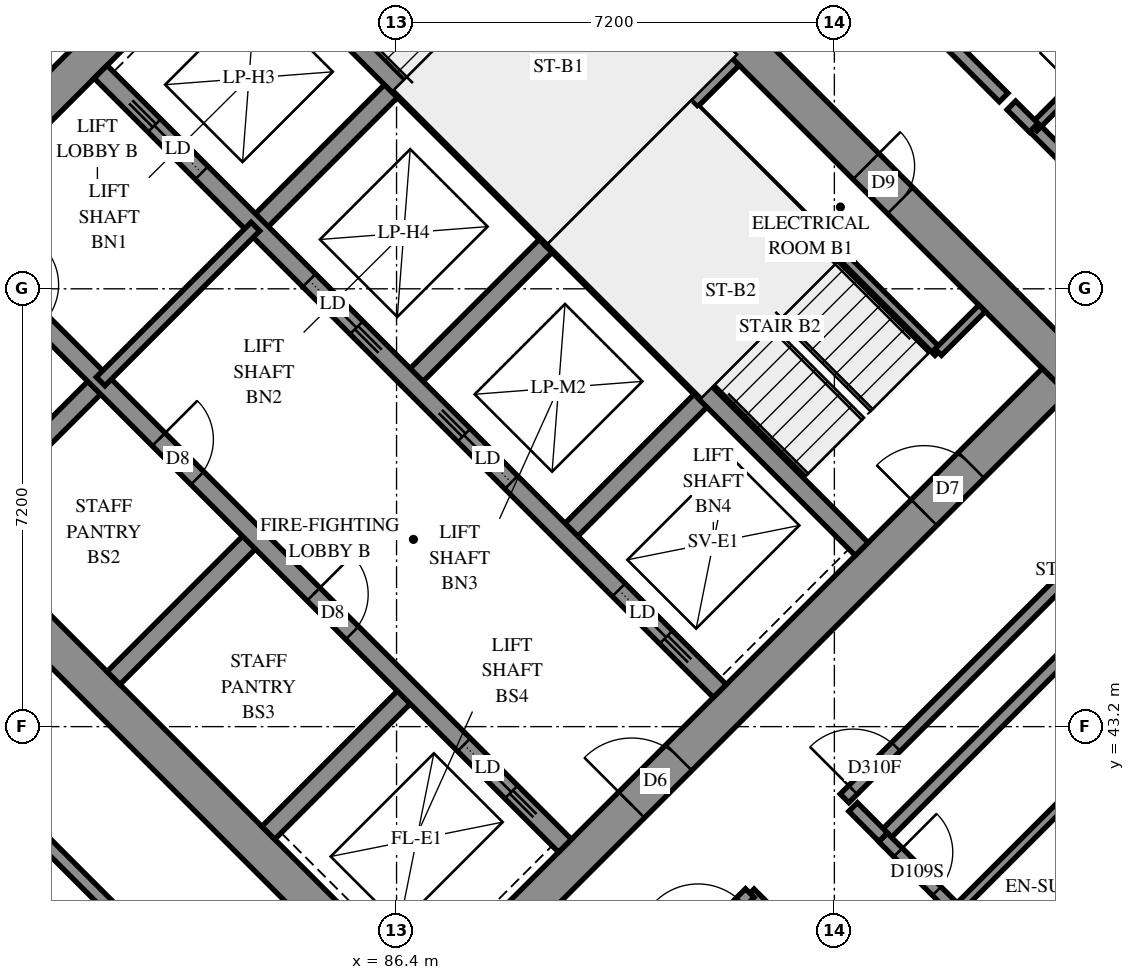
"""IFC4 building model, lengths in metres.
Left out: names, types, materials, properties, quantities, classifications, styles, units other than length and angle.
Written with IfcOpenShell. Run it as: python <this file> out.ifc"""

import sys

from ifc_helpers import new_model, si_unit, direction, frame, frame_2d, origin, place, context, subcontext, project, spatial, rectangle, extrude, element, fill, save


model = new_model("IFC4")
c1 = context("Model", 3, precision=1e-05, world=origin(), true_north=direction((0.0, 1.0)))
c2 = subcontext(c1, "Body", "Model", "MODEL_VIEW")
j1 = project(units=[si_unit("LENGTHUNIT", "METRE"), si_unit("PLANEANGLEUNIT", "RADIAN")], contexts=[c1])
p1 = place(None, origin())
s1 = spatial("IfcSite", under=j1, at=p1, CompositionType="ELEMENT")
p2 = place(p1, origin())
s2 = spatial("IfcBuilding", under=s1, at=p2, CompositionType="ELEMENT")
p3 = place(p2, frame((0.0, 0.0, 155.8)))
s3 = spatial("IfcBuildingStorey", under=s2, at=p3, CompositionType="ELEMENT", Elevation=155.8)
p4 = place(p3, frame((76.018, 49.302, -0.3), z_axis=(0.0, 0.0, 1.0), x_axis=(0.7071067812, -0.7071067812, 0.0)))
e1 = element("IfcWall", 1, at=p4, inside=s3, PredefinedType="SHEAR", context=c2, shape_type="SweptSolid", body=[
    extrude(rectangle(XDim=15.6, YDim=0.6, at=frame_2d((7.8, 0.0))), origin(), (0.0, 0.0, 1.0), 2.7),
])
p5 = place(p3, frame((86.625, 59.908, -0.3), z_axis=(0.0, 0.0, 1.0), x_axis=(0.7071067812, -0.7071067812, 0.0)))
e2 = element("IfcWall", 2, at=p5, inside=s3, PredefinedType="SHEAR", context=c2, shape_type="SweptSolid", body=[
    extrude(rectangle(XDim=15.6, YDim=0.6, at=frame_2d((7.8, 0.0))), origin(), (0.0, 0.0, 1.0), 2.7),
])
p6 = place(p5, frame((10.6, 0.0, 0.3)))
e3 = element("IfcOpeningElement", 3, at=p6, cuts=e2, PredefinedType="OPENING", context=c2, shape_type="SweptSolid", body=[
    extrude(rectangle(XDim=0.8, YDim=2.1, at=frame_2d((0.4, 1.05))), frame((0.0, 0.31, 0.0), z_axis=(0.0, -1.0, 0.0), x_axis=(1.0, 0.0, 0.0)), (0.0, 0.0, 1.0), 0.62),
])
p7 = place(p3, frame((76.442, 49.302, -0.3), z_axis=(0.0, 0.0, 1.0), x_axis=(0.7071067812, 0.7071067812, 0.0)))
e4 = element("IfcWall", 4, at=p7, inside=s3, PredefinedType="SHEAR", context=c2, shape_type="SweptSolid", body=[
    extrude(rectangle(XDim=14.4, YDim=0.6, at=frame_2d((7.2, 0.0))), origin(), (0.0, 0.0, 1.0), 2.7),
])
p8 = place(p7, frame((4.55, 0.0, 0.3)))
e5 = element("IfcOpeningElement", 5, at=p8, cuts=e4, PredefinedType="OPENING", context=c2, shape_type="SweptSolid", body=[
    extrude(rectangle(XDim=1.1, YDim=2.1, at=frame_2d((0.55, 1.05))), frame((0.0, 0.31, 0.0), z_axis=(0.0, -1.0, 0.0), x_axis=(1.0, 0.0, 0.0)), (0.0, 0.0, 1.0), 0.62),
])
p9 = place(p7, frame((11.35, 0.0, 0.3)))
e6 = element("IfcOpeningElement", 6, at=p9, cuts=e4, PredefinedType="OPENING", context=c2, shape_type="SweptSolid", body=[
    extrude(rectangle(XDim=1.1, YDim=2.1, at=frame_2d((0.55, 1.05))), frame((0.0, 0.31, 0.0), z_axis=(0.0, -1.0, 0.0), x_axis=(1.0, 0.0, 0.0)), (0.0, 0.0, 1.0), 0.62),
])
p10 = place(p3, frame((87.049, 38.695, -0.3), z_axis=(0.0, 0.0, 1.0), x_axis=(0.7071067812, 0.7071067812, 0.0)))
e7 = element("IfcWall", 7, at=p10, inside=s3, PredefinedType="SHEAR", context=c2, shape_type="SweptSolid", body=[
    extrude(rectangle(XDim=14.4, YDim=0.6, at=frame_2d((7.2, 0.0))), origin(), (0.0, 0.0, 1.0), 2.7),
])
p11 = place(p10, frame((4.55, 0.0, 0.3)))
e8 = element("IfcOpeningElement", 8, at=p11, cuts=e7, PredefinedType="OPENING", context=c2, shape_type="SweptSolid", body=[
    extrude(rectangle(XDim=1.1, YDim=2.1, at=frame_2d((0.55, 1.05))), frame((0.0, 0.31, 0.0), z_axis=(0.0, -1.0, 0.0), x_axis=(1.0, 0.0, 0.0)), (0.0, 0.0, 1.0), 0.62),
])
p12 = place(p10, frame((11.35, 0.0, 0.3)))
e9 = element("IfcOpeningElement", 9, at=p12, cuts=e7, PredefinedType="OPENING", context=c2, shape_type="SweptSolid", body=[
    extrude(rectangle(XDim=1.1, YDim=2.1, at=frame_2d((0.55, 1.05))), frame((0.0, 0.31, 0.0), z_axis=(0.0, -1.0, 0.0), x_axis=(1.0, 0.0, 0.0)), (0.0, 0.0, 1.0), 0.62),
])
for number, where, z_axis, x_axis in (
    (10, (79.2, 46.544, 0.0), (0.0, 0.0, 1.0), (0.707, 0.707, 0.0)),
    (11, (84.079, 51.423, 0.0), (0.0, 0.0, 1.0), (0.707, 0.707, 0.0)),
):
    element("IfcWall", number, at=place(p3, frame(where, z_axis=z_axis, x_axis=x_axis)), inside=s3, PredefinedType="SOLIDWALL", context=c2, shape_type="SweptSolid", body=[
        extrude(rectangle(XDim=3.3, YDim=0.3, at=frame_2d((1.65, 0.0))), origin(), (0.0, 0.0, 1.0), 3.1),
    ])
p13 = place(p3, frame((81.746, 43.999, 0.0), z_axis=(0.0, 0.0, 1.0), x_axis=(0.7071067812, 0.7071067812, 0.0)))
e12 = element("IfcWall", 12, at=p13, inside=s3, PredefinedType="SOLIDWALL", context=c2, shape_type="SweptSolid", body=[
    extrude(rectangle(XDim=3.3, YDim=0.3, at=frame_2d((1.65, 0.0))), origin(), (0.0, 0.0, 1.0), 3.1),
])
p14 = place(p3, frame((86.625, 48.878, 0.0), z_axis=(0.0, 0.0, 1.0), x_axis=(0.7071067812, 0.7071067812, 0.0)))
e13 = element("IfcWall", 13, at=p14, inside=s3, PredefinedType="SOLIDWALL", context=c2, shape_type="SweptSolid", body=[
    extrude(rectangle(XDim=3.3, YDim=0.3, at=frame_2d((1.65, 0.0))), origin(), (0.0, 0.0, 1.0), 3.1),
])
p15 = place(p3, frame((84.291, 41.453, 0.0), z_axis=(0.0, 0.0, 1.0), x_axis=(0.7071067812, 0.7071067812, 0.0)))
e14 = element("IfcWall", 14, at=p15, inside=s3, PredefinedType="SOLIDWALL", context=c2, shape_type="SweptSolid", body=[
    extrude(rectangle(XDim=3.3, YDim=0.3, at=frame_2d((1.65, 0.0))), origin(), (0.0, 0.0, 1.0), 3.1),
])
p16 = place(p3, frame((89.17, 46.332, 0.0), z_axis=(0.0, 0.0, 1.0), x_axis=(0.7071067812, 0.7071067812, 0.0)))
e15 = element("IfcWall", 15, at=p16, inside=s3, PredefinedType="SOLIDWALL", context=c2, shape_type="SweptSolid", body=[
    extrude(rectangle(XDim=3.3, YDim=0.3, at=frame_2d((1.65, 0.0))), origin(), (0.0, 0.0, 1.0), 3.1),
])
p17 = place(p3, frame((78.988, 51.423, 0.0), z_axis=(0.0, 0.0, 1.0), x_axis=(0.7071067812, -0.7071067812, 0.0)))
e16 = element("IfcWall", 16, at=p17, inside=s3, PredefinedType="SOLIDWALL", context=c2, shape_type="SweptSolid", body=[
    extrude(rectangle(XDim=14.4, YDim=0.3, at=frame_2d((7.2, 0.0))), origin(), (0.0, 0.0, 1.0), 3.1),
])
p18 = place(p17, frame((1.35, 0.0, 0.0)))
e17 = element("IfcOpeningElement", 17, at=p18, cuts=e16, PredefinedType="OPENING", context=c2, shape_type="SweptSolid", body=[
    extrude(rectangle(XDim=0.9, YDim=2.1, at=frame_2d((0.45, 1.05))), frame((0.0, 0.16, 0.0), z_axis=(0.0, -1.0, 0.0), x_axis=(1.0, 0.0, 0.0)), (0.0, 0.0, 1.0), 0.32),
])
p19 = place(p17, frame((4.95, 0.0, 0.0)))
e18 = element("IfcOpeningElement", 18, at=p19, cuts=e16, PredefinedType="OPENING", context=c2, shape_type="SweptSolid", body=[
    extrude(rectangle(XDim=0.9, YDim=2.1, at=frame_2d((0.45, 1.05))), frame((0.0, 0.16, 0.0), z_axis=(0.0, -1.0, 0.0), x_axis=(1.0, 0.0, 0.0)), (0.0, 0.0, 1.0), 0.32),
])
p20 = place(p17, frame((8.55, 0.0, 0.0)))
e19 = element("IfcOpeningElement", 19, at=p20, cuts=e16, PredefinedType="OPENING", context=c2, shape_type="SweptSolid", body=[
    extrude(rectangle(XDim=0.9, YDim=2.1, at=frame_2d((0.45, 1.05))), frame((0.0, 0.16, 0.0), z_axis=(0.0, -1.0, 0.0), x_axis=(1.0, 0.0, 0.0)), (0.0, 0.0, 1.0), 0.32),
])
p21 = place(p17, frame((12.05, 0.0, 0.0)))
e20 = element("IfcOpeningElement", 20, at=p21, cuts=e16, PredefinedType="OPENING", context=c2, shape_type="SweptSolid", body=[
    extrude(rectangle(XDim=1.1, YDim=2.1, at=frame_2d((0.55, 1.05))), frame((0.0, 0.16, 0.0), z_axis=(0.0, -1.0, 0.0), x_axis=(1.0, 0.0, 0.0)), (0.0, 0.0, 1.0), 0.32),
])
p22 = place(p3, frame((81.534, 53.969, 0.0), z_axis=(0.0, 0.0, 1.0), x_axis=(0.707103309, -0.7071102534, 0.0)))
e21 = element("IfcWall", 21, at=p22, inside=s3, PredefinedType="SOLIDWALL", context=c2, shape_type="SweptSolid", body=[
    extrude(rectangle(XDim=14.4, YDim=0.3, at=frame_2d((7.2, 0.0))), origin(), (0.0, 0.0, 1.0), 3.1),
])
p23 = place(p22, frame((1.25, 0.0, 0.0)))
e22 = element("IfcOpeningElement", 22, at=p23, cuts=e21, PredefinedType="OPENING", context=c2, shape_type="SweptSolid", body=[
    extrude(rectangle(XDim=1.1, YDim=2.1, at=frame_2d((0.55, 1.05))), frame((0.0, 0.16, 0.0), z_axis=(0.0, -1.0, 0.0), x_axis=(1.0, 0.0, 0.0)), (0.0, 0.0, 1.0), 0.32),
])
p24 = place(p22, frame((4.85, 0.0, 0.0)))
e23 = element("IfcOpeningElement", 23, at=p24, cuts=e21, PredefinedType="OPENING", context=c2, shape_type="SweptSolid", body=[
    extrude(rectangle(XDim=1.1, YDim=2.1, at=frame_2d((0.55, 1.05))), frame((0.0, 0.16, 0.0), z_axis=(0.0, -1.0, 0.0), x_axis=(1.0, 0.0, 0.0)), (0.0, 0.0, 1.0), 0.32),
])
p25 = place(p22, frame((8.45, 0.0, 0.0)))
e24 = element("IfcOpeningElement", 24, at=p25, cuts=e21, PredefinedType="OPENING", context=c2, shape_type="SweptSolid", body=[
    extrude(rectangle(XDim=1.1, YDim=2.1, at=frame_2d((0.55, 1.05))), frame((0.0, 0.16, 0.0), z_axis=(0.0, -1.0, 0.0), x_axis=(1.0, 0.0, 0.0)), (0.0, 0.0, 1.0), 0.32),
])
p26 = place(p22, frame((12.05, 0.0, 0.0)))
e25 = element("IfcOpeningElement", 25, at=p26, cuts=e21, PredefinedType="OPENING", context=c2, shape_type="SweptSolid", body=[
    extrude(rectangle(XDim=1.1, YDim=2.1, at=frame_2d((0.55, 1.05))), frame((0.0, 0.16, 0.0), z_axis=(0.0, -1.0, 0.0), x_axis=(1.0, 0.0, 0.0)), (0.0, 0.0, 1.0), 0.32),
])
for number, where, z_axis, x_axis in (
    (26, (83.867, 56.302, 0.0), (0.0, 0.0, 1.0), (0.707, -0.707, 0.0)),
    (27, (88.958, 51.211, 0.0), (0.0, 0.0, 1.0), (0.707, -0.707, 0.0)),
):
    element("IfcWall", number, at=place(p3, frame(where, z_axis=z_axis, x_axis=x_axis)), inside=s3, PredefinedType="SOLIDWALL", context=c2, shape_type="SweptSolid", body=[
        extrude(rectangle(XDim=7.2, YDim=0.3, at=frame_2d((3.6, 0.0))), origin(), (0.0, 0.0, 1.0), 3.1),
    ])
p27 = place(p3, frame((88.958, 51.211, 0.0), z_axis=(0.0, 0.0, 1.0), x_axis=(0.7071067812, 0.7071067812, 0.0)))
e28 = element("IfcWall", 28, at=p27, inside=s3, PredefinedType="SOLIDWALL", context=c2, shape_type="SweptSolid", body=[
    extrude(rectangle(XDim=4.2, YDim=0.3, at=frame_2d((2.1, 0.0))), origin(), (0.0, 0.0, 1.0), 3.1),
])
p28 = place(p3, frame((91.313, 53.354, 0.0), z_axis=(0.0, 0.0, 1.0), x_axis=(0.7071067812, -0.7071067812, 0.0)))
e29 = element("IfcWall", 29, at=p28, inside=s3, PredefinedType="PARTITIONING", context=c2, shape_type="SweptSolid", body=[
    extrude(rectangle(XDim=5.65, YDim=0.15, at=frame_2d((2.825, 0.0))), origin(), (0.0, 0.0, 1.0), 3.1),
])
p29 = place(p3, frame((95.308, 49.358, 0.0), z_axis=(0.0, 0.0, 1.0), x_axis=(0.70705776, 0.707155799, 0.0)))
e30 = element("IfcWall", 30, at=p29, inside=s3, PredefinedType="PARTITIONING", context=c2, shape_type="SweptSolid", body=[
    extrude(rectangle(XDim=1.02, YDim=0.15, at=frame_2d((0.51, 0.0))), origin(), (0.0, 0.0, 1.0), 3.1),
])
p30 = place(p3, frame((81.534, 48.878, 0.0), z_axis=(0.0, 0.0, 1.0), x_axis=(0.707092892, 0.7071206701, 0.0)))
e31 = element("IfcWall", 31, at=p30, inside=s3, PredefinedType="PARTITIONING", context=c2, shape_type="SweptSolid", body=[
    extrude(rectangle(XDim=3.6, YDim=0.2, at=frame_2d((1.8, 0.0))), origin(), (0.0, 0.0, 1.0), 3.1),
])
p31 = place(p3, frame((94.401, 41.383, 0.0), z_axis=(0.0, 0.0, 1.0), x_axis=(0.7071067812, 0.7071067812, 0.0)))
e32 = element("IfcWall", 32, at=p31, inside=s3, PredefinedType="PARTITIONING", context=c2, shape_type="SweptSolid", body=[
    extrude(rectangle(XDim=12.014, YDim=0.2, at=frame_2d((6.007, 0.0))), origin(), (0.0, 0.0, 1.0), 3.1),
])
p32 = place(p3, frame((92.209, 40.459, 0.0), z_axis=(0.0, 0.0, 1.0), x_axis=(0.7071067812, -0.7071067812, 0.0)))
e33 = element("IfcWall", 33, at=p32, inside=s3, PredefinedType="PARTITIONING", context=c2, shape_type="SweptSolid", body=[
    extrude(rectangle(XDim=11.698, YDim=0.2, at=frame_2d((5.849, 0.0))), origin(), (0.0, 0.0, 1.0), 3.1),
])
p33 = place(p32, frame((3.047, 0.0, 0.0)))
e34 = element("IfcOpeningElement", 34, at=p33, cuts=e33, PredefinedType="OPENING", context=c2, shape_type="SweptSolid", body=[
    extrude(rectangle(XDim=0.9, YDim=2.1, at=frame_2d((0.45, 1.05))), frame((0.0, 0.11, 0.0), z_axis=(0.0, -1.0, 0.0), x_axis=(1.0, 0.0, 0.0)), (0.0, 0.0, 1.0), 0.22),
])
p34 = place(p32, frame((8.056, 0.0, 0.0)))
e35 = element("IfcOpeningElement", 35, at=p34, cuts=e33, PredefinedType="OPENING", context=c2, shape_type="SweptSolid", body=[
    extrude(rectangle(XDim=1.0, YDim=2.1, at=frame_2d((0.5, 1.05))), frame((0.0, 0.11, 0.0), z_axis=(0.0, -1.0, 0.0), x_axis=(1.0, 0.0, 0.0)), (0.0, 0.0, 1.0), 0.22),
])
p35 = place(p3, frame((93.767, 42.021, 0.0), z_axis=(0.0, 0.0, 1.0), x_axis=(0.7071067812, 0.7071067812, 0.0)))
e36 = element("IfcWall", 36, at=p35, inside=s3, PredefinedType="PARTITIONING", context=c2, shape_type="SweptSolid", body=[
    extrude(rectangle(XDim=9.998, YDim=0.2, at=frame_2d((4.999, 0.0))), origin(), (0.0, 0.0, 1.0), 3.1),
])
p36 = place(p35, frame((0.196, 0.0, 0.0)))
e37 = element("IfcOpeningElement", 37, at=p36, cuts=e36, PredefinedType="OPENING", context=c2, shape_type="SweptSolid", body=[
    extrude(rectangle(XDim=1.0, YDim=2.1, at=frame_2d((0.5, 1.05))), frame((0.0, 0.11, 0.0), z_axis=(0.0, -1.0, 0.0), x_axis=(1.0, 0.0, 0.0)), (0.0, 0.0, 1.0), 0.22),
])
p37 = place(p3, frame((80.423, 41.497, 0.0), z_axis=(0.0, 0.0, 1.0), x_axis=(0.7071067812, -0.7071067812, 0.0)))
e38 = element("IfcWall", 38, at=p37, inside=s3, PredefinedType="PARTITIONING", context=c2, shape_type="SweptSolid", body=[
    extrude(rectangle(XDim=9.065, YDim=0.2, at=frame_2d((4.532, 0.0))), origin(), (0.0, 0.0, 1.0), 3.1),
])
p38 = place(p3, frame((86.837, 35.091, 0.0), z_axis=(0.0, 0.0, 1.0), x_axis=(0.7071067812, 0.7071067812, 0.0)))
e39 = element("IfcWall", 39, at=p38, inside=s3, PredefinedType="PARTITIONING", context=c2, shape_type="SweptSolid", body=[
    extrude(rectangle(XDim=7.597, YDim=0.2, at=frame_2d((3.799, 0.0))), origin(), (0.0, 0.0, 1.0), 3.1),
])
p39 = place(p38, frame((6.395, 0.0, 0.0)))
e40 = element("IfcOpeningElement", 40, at=p39, cuts=e39, PredefinedType="OPENING", context=c2, shape_type="SweptSolid", body=[
    extrude(rectangle(XDim=1.0, YDim=2.1, at=frame_2d((0.5, 1.05))), frame((0.0, 0.11, 0.0), z_axis=(0.0, -1.0, 0.0), x_axis=(1.0, 0.0, 0.0)), (0.0, 0.0, 1.0), 0.22),
])
p40 = place(p3, frame((94.399, 41.379, 0.0), z_axis=(0.0, 0.0, 1.0), x_axis=(0.7071067812, -0.7071067812, 0.0)))
e41 = element("IfcWall", 41, at=p40, inside=s3, PredefinedType="PARTITIONING", context=c2, shape_type="SweptSolid", body=[
    extrude(rectangle(XDim=3.601, YDim=0.2, at=frame_2d((1.8, 0.0))), origin(), (0.0, 0.0, 1.0), 3.1),
])
p41 = place(p40, frame((0.35, 0.0, 0.0)))
e42 = element("IfcOpeningElement", 42, at=p41, cuts=e41, PredefinedType="OPENING", context=c2, shape_type="SweptSolid", body=[
    extrude(rectangle(XDim=0.9, YDim=2.1, at=frame_2d((0.45, 1.05))), frame((0.0, 0.11, 0.0), z_axis=(0.0, -1.0, 0.0), x_axis=(1.0, 0.0, 0.0)), (0.0, 0.0, 1.0), 0.22),
])
p42 = place(p3, frame((96.882, 53.053, 0.0), z_axis=(0.0, 0.0, 1.0), x_axis=(0.7071067812, -0.7071067812, 0.0)))
e43 = element("IfcWall", 43, at=p42, inside=s3, PredefinedType="PARTITIONING", context=c2, shape_type="SweptSolid", body=[
    extrude(rectangle(XDim=2.86, YDim=0.2, at=frame_2d((1.43, 0.0))), origin(), (0.0, 0.0, 1.0), 3.1),
])
for number, where, z_axis, x_axis in (
    (44, (95.603, 40.181, 0.0), (0.0, 0.0, 1.0), (0.707, 0.707, 0.0)),
    (45, (96.947, 38.837, 0.0), (0.0, 0.0, 1.0), (0.707, 0.707, 0.0)),
):
    element("IfcWall", number, at=place(p3, frame(where, z_axis=z_axis, x_axis=x_axis)), inside=s3, PredefinedType="PARTITIONING", context=c2, shape_type="SweptSolid", body=[
        extrude(rectangle(XDim=2.401, YDim=0.15, at=frame_2d((1.201, 0.0))), origin(), (0.0, 0.0, 1.0), 3.1),
    ])
p43 = place(p3, frame((96.877, 53.051, 0.0), z_axis=(0.0, 0.0, 1.0), x_axis=(0.707131173, 0.7070823885, 0.0)))
e46 = element("IfcWall", 46, at=p43, inside=s3, PredefinedType="PARTITIONING", context=c2, shape_type="SweptSolid", body=[
    extrude(rectangle(XDim=2.05, YDim=0.15, at=frame_2d((1.025, 0.0))), origin(), (0.0, 0.0, 1.0), 3.1),
])
p44 = place(p43, frame((0.946, 0.0, 0.0)))
e47 = element("IfcOpeningElement", 47, at=p44, cuts=e46, PredefinedType="OPENING", context=c2, shape_type="SweptSolid", body=[
    extrude(rectangle(XDim=0.8, YDim=2.1, at=frame_2d((0.4, 1.05))), frame((0.0, 0.085, 0.0), z_axis=(0.0, -1.0, 0.0), x_axis=(1.0, 0.0, 0.0)), (0.0, 0.0, 1.0), 0.17),
])
p45 = place(p3, frame((95.494, 54.438, 0.0), z_axis=(0.0, 0.0, 1.0), x_axis=(0.706312726, -0.7078999456, 0.0)))
e48 = element("IfcWall", 48, at=p45, inside=s3, PredefinedType="PARTITIONING", context=c2, shape_type="SweptSolid", body=[
    extrude(rectangle(XDim=1.26, YDim=0.2, at=frame_2d((0.63, 0.0))), origin(), (0.0, 0.0, 1.0), 3.1),
])
p46 = place(p3, frame((93.909, 41.879, 0.0), z_axis=(0.0, 0.0, 1.0), x_axis=(0.7056768426, -0.7085338339, 0.0)))
e49 = element("IfcWall", 49, at=p46, inside=s3, PredefinedType="PARTITIONING", context=c2, shape_type="SweptSolid", body=[
    extrude(rectangle(XDim=0.7, YDim=0.2, at=frame_2d((0.35, 0.0))), origin(), (0.0, 0.0, 1.0), 3.1),
])
p47 = place(p3, frame((96.51, 53.416, 0.0), z_axis=(0.0, 0.0, 1.0), x_axis=(0.7090308706, -0.7051774419, 0.0)))
e50 = element("IfcWall", 50, at=p47, inside=s3, PredefinedType="PARTITIONING", context=c2, shape_type="SweptSolid", body=[
    extrude(rectangle(XDim=0.519, YDim=0.2, at=frame_2d((0.26, 0.0))), origin(), (0.0, 0.0, 1.0), 3.1),
])
p48 = place(p6, origin())
e51 = element("IfcDoor", 51, at=p48, inside=s3, OperationType="SINGLE_SWING_RIGHT", PredefinedType="DOOR", context=c2, shape_type="SweptSolid", body=[
    extrude(rectangle(XDim=0.8, YDim=2.1, at=frame_2d((0.4, 1.05))), frame((0.0, 0.025, 0.0), z_axis=(0.0, -1.0, 0.0), x_axis=(1.0, 0.0, 0.0)), (0.0, 0.0, 1.0), 0.05),
])
fill(e3, e51)
p49 = place(p11, origin())
e52 = element("IfcDoor", 52, at=p49, inside=s3, OperationType="DOUBLE_DOOR_SINGLE_SWING", PredefinedType="DOOR", context=c2, shape_type="SweptSolid", body=[
    extrude(rectangle(XDim=1.1, YDim=2.1, at=frame_2d((0.55, 1.05))), frame((0.0, 0.025, 0.0), z_axis=(0.0, -1.0, 0.0), x_axis=(1.0, 0.0, 0.0)), (0.0, 0.0, 1.0), 0.05),
])
fill(e8, e52)
p50 = place(p12, origin())
e53 = element("IfcDoor", 53, at=p50, inside=s3, OperationType="SINGLE_SWING_RIGHT", PredefinedType="DOOR", context=c2, shape_type="SweptSolid", body=[
    extrude(rectangle(XDim=1.1, YDim=2.1, at=frame_2d((0.55, 1.05))), frame((0.0, 0.025, 0.0), z_axis=(0.0, -1.0, 0.0), x_axis=(1.0, 0.0, 0.0)), (0.0, 0.0, 1.0), 0.05),
])
fill(e9, e53)
p51 = place(p19, origin())
e54 = element("IfcDoor", 54, at=p51, inside=s3, OperationType="SINGLE_SWING_LEFT", PredefinedType="DOOR", context=c2, shape_type="SweptSolid", body=[
    extrude(rectangle(XDim=0.9, YDim=2.1, at=frame_2d((0.45, 1.05))), frame((0.0, 0.025, 0.0), z_axis=(0.0, -1.0, 0.0), x_axis=(1.0, 0.0, 0.0)), (0.0, 0.0, 1.0), 0.05),
])
fill(e18, e54)
p52 = place(p20, origin())
e55 = element("IfcDoor", 55, at=p52, inside=s3, OperationType="SINGLE_SWING_LEFT", PredefinedType="DOOR", context=c2, shape_type="SweptSolid", body=[
    extrude(rectangle(XDim=0.9, YDim=2.1, at=frame_2d((0.45, 1.05))), frame((0.0, 0.025, 0.0), z_axis=(0.0, -1.0, 0.0), x_axis=(1.0, 0.0, 0.0)), (0.0, 0.0, 1.0), 0.05),
])
fill(e19, e55)
p53 = place(p21, origin())
e56 = element("IfcDoor", 56, at=p53, inside=s3, OperationType="SLIDING_TO_RIGHT", PredefinedType="DOOR", context=c2, shape_type="SweptSolid", body=[
    extrude(rectangle(XDim=1.1, YDim=2.1, at=frame_2d((0.55, 1.05))), frame((0.0, 0.025, 0.0), z_axis=(0.0, -1.0, 0.0), x_axis=(1.0, 0.0, 0.0)), (0.0, 0.0, 1.0), 0.05),
])
fill(e20, e56)
p54 = place(p23, origin())
e57 = element("IfcDoor", 57, at=p54, inside=s3, OperationType="SLIDING_TO_LEFT", PredefinedType="DOOR", context=c2, shape_type="SweptSolid", body=[
    extrude(rectangle(XDim=1.1, YDim=2.1, at=frame_2d((0.55, 1.05))), frame((0.0, 0.025, 0.0), z_axis=(0.0, -1.0, 0.0), x_axis=(1.0, 0.0, 0.0)), (0.0, 0.0, 1.0), 0.05),
])
fill(e22, e57)
p55 = place(p24, origin())
e58 = element("IfcDoor", 58, at=p55, inside=s3, OperationType="SLIDING_TO_RIGHT", PredefinedType="DOOR", context=c2, shape_type="SweptSolid", body=[
    extrude(rectangle(XDim=1.1, YDim=2.1, at=frame_2d((0.55, 1.05))), frame((0.0, 0.025, 0.0), z_axis=(0.0, -1.0, 0.0), x_axis=(1.0, 0.0, 0.0)), (0.0, 0.0, 1.0), 0.05),
])
fill(e23, e58)
p56 = place(p25, origin())
e59 = element("IfcDoor", 59, at=p56, inside=s3, OperationType="SLIDING_TO_LEFT", PredefinedType="DOOR", context=c2, shape_type="SweptSolid", body=[
    extrude(rectangle(XDim=1.1, YDim=2.1, at=frame_2d((0.55, 1.05))), frame((0.0, 0.025, 0.0), z_axis=(0.0, -1.0, 0.0), x_axis=(1.0, 0.0, 0.0)), (0.0, 0.0, 1.0), 0.05),
])
fill(e24, e59)
p57 = place(p26, origin())
e60 = element("IfcDoor", 60, at=p57, inside=s3, OperationType="SLIDING_TO_RIGHT", PredefinedType="DOOR", context=c2, shape_type="SweptSolid", body=[
    extrude(rectangle(XDim=1.1, YDim=2.1, at=frame_2d((0.55, 1.05))), frame((0.0, 0.025, 0.0), z_axis=(0.0, -1.0, 0.0), x_axis=(1.0, 0.0, 0.0)), (0.0, 0.0, 1.0), 0.05),
])
fill(e25, e60)
p58 = place(p36, origin())
e61 = element("IfcDoor", 61, at=p58, inside=s3, OperationType="SINGLE_SWING_LEFT", PredefinedType="DOOR", context=c2, shape_type="SweptSolid", body=[
    extrude(rectangle(XDim=1.0, YDim=2.1, at=frame_2d((0.5, 1.05))), frame((0.0, 0.025, 0.0), z_axis=(0.0, -1.0, 0.0), x_axis=(1.0, 0.0, 0.0)), (0.0, 0.0, 1.0), 0.05),
])
fill(e37, e61)
p59 = place(p41, origin())
e62 = element("IfcDoor", 62, at=p59, inside=s3, OperationType="SINGLE_SWING_RIGHT", PredefinedType="DOOR", context=c2, shape_type="SweptSolid", body=[
    extrude(rectangle(XDim=0.9, YDim=2.1, at=frame_2d((0.45, 1.05))), frame((0.0, 0.025, 0.0), z_axis=(0.0, -1.0, 0.0), x_axis=(1.0, 0.0, 0.0)), (0.0, 0.0, 1.0), 0.05),
])
fill(e42, e62)
save(model, sys.argv[1])
